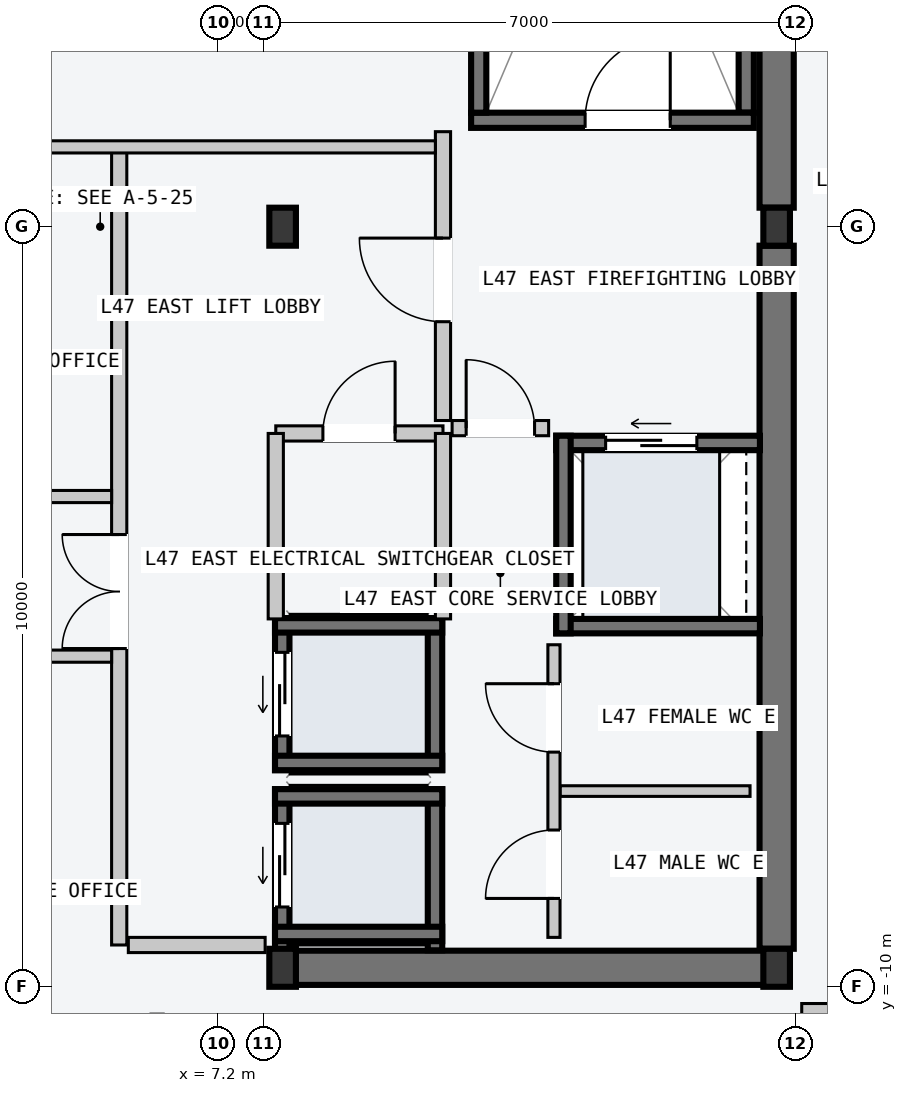
"""IFC4 building model, lengths in metres.
Left out: names, types, materials, properties, quantities, classifications, styles, units other than length and angle.
Written with IfcOpenShell. Run it as: python <this file> out.ifc"""

import sys

from ifc_helpers import new_model, si_unit, direction, frame, frame_2d, origin, origin_2d, place, context, subcontext, project, spatial, rectangle, i_section, extrude, element, fill, save


model = new_model("IFC4")
c1 = context("Model", 3, precision=1e-05, world=origin(), true_north=direction((0.0, 1.0)))
c2 = subcontext(c1, "Body", "Model", "MODEL_VIEW")
j1 = project(units=[si_unit("LENGTHUNIT", "METRE"), si_unit("PLANEANGLEUNIT", "RADIAN")], contexts=[c1])
p1 = place(None, origin())
s1 = spatial("IfcSite", under=j1, at=p1, CompositionType="ELEMENT")
p2 = place(p1, origin())
s2 = spatial("IfcBuilding", under=s1, at=p2, CompositionType="ELEMENT")
p3 = place(p2, frame((0.0, 0.0, 180.3)))
s3 = spatial("IfcBuildingStorey", under=s2, at=p3, CompositionType="ELEMENT", Elevation=180.3)
p4 = place(p3, frame((8.07, -9.75, -0.2), z_axis=(0.0, 0.0, 1.0), x_axis=(1.0, 0.0, 0.0)))
e1 = element("IfcWall", 1, at=p4, inside=s3, PredefinedType="SHEAR", context=c2, shape_type="SweptSolid", body=[
    extrude(rectangle(XDim=6.46, YDim=0.45, at=frame_2d((3.23, 0.0))), origin(), (0.0, 0.0, 1.0), 3.6),
])
for number, where, z_axis, x_axis in (
    (2, (14.55, -9.5, -0.2), (0.0, 0.0, 1.0), (0.0, 1.0, 0.0)),
    (3, (14.55, 0.25, -0.2), (0.0, 0.0, 1.0), (0.0, 1.0, 0.0)),
):
    element("IfcWall", number, at=place(p3, frame(where, z_axis=z_axis, x_axis=x_axis)), inside=s3, PredefinedType="SHEAR", context=c2, shape_type="SweptSolid", body=[
        extrude(rectangle(XDim=9.25, YDim=0.45, at=frame_2d((4.625, 0.0))), origin(), (0.0, 0.0, 1.0), 3.6),
    ])
p5 = place(p3, frame((14.15, 1.5, -0.2), z_axis=(0.0, 0.0, 1.0), x_axis=(0.0, 1.0, 0.0)))
e4 = element("IfcWall", 4, at=p5, inside=s3, PredefinedType="SOLIDWALL", context=c2, shape_type="SweptSolid", body=[
    extrude(rectangle(XDim=7.8, YDim=0.2, at=frame_2d((3.9, 0.0))), origin(), (0.0, 0.0, 1.0), 3.6),
])
p6 = place(p3, frame((10.53, 1.4, -0.2), z_axis=(0.0, 0.0, 1.0), x_axis=(1.0, 0.0, 0.0)))
e5 = element("IfcWall", 5, at=p6, inside=s3, PredefinedType="SOLIDWALL", context=c2, shape_type="SweptSolid", body=[
    extrude(rectangle(XDim=3.72, YDim=0.2, at=frame_2d((1.86, 0.0))), origin(), (0.0, 0.0, 1.0), 3.6),
])
p7 = place(p6, frame((1.5, 0.0, 0.2)))
e6 = element("IfcOpeningElement", 6, at=p7, cuts=e5, PredefinedType="OPENING", context=c2, shape_type="SweptSolid", body=[
    extrude(rectangle(XDim=1.12, YDim=2.18, at=frame_2d((0.56, 1.09))), frame((0.0, 0.11, 0.0), z_axis=(0.0, -1.0, 0.0), x_axis=(1.0, 0.0, 0.0)), (0.0, 0.0, 1.0), 0.22),
])
p8 = place(p3, frame((10.63, 1.5, -0.2), z_axis=(0.0, 0.0, 1.0), x_axis=(0.0, 1.0, 0.0)))
e7 = element("IfcWall", 7, at=p8, inside=s3, PredefinedType="SOLIDWALL", context=c2, shape_type="SweptSolid", body=[
    extrude(rectangle(XDim=7.8, YDim=0.2, at=frame_2d((3.9, 0.0))), origin(), (0.0, 0.0, 1.0), 3.6),
])
for number, where, z_axis, x_axis in (
    (8, (8.05, -9.75, 0.0), (0.0, 0.0, 1.0), (1.0, 0.0, 0.0)),
    (9, (8.05, 0.0, 0.0), (0.0, 0.0, 1.0), (1.0, 0.0, 0.0)),
    (10, (14.55, -9.75, 0.0), (0.0, 0.0, 1.0), (1.0, 0.0, 0.0)),
    (11, (14.55, 0.0, 0.0), (0.0, 0.0, 1.0), (1.0, 0.0, 0.0)),
):
    element("IfcColumn", number, at=place(p3, frame(where, z_axis=z_axis, x_axis=x_axis)), inside=s3, PredefinedType="COLUMN", context=c2, shape_type="SweptSolid", body=[
        extrude(i_section(OverallWidth=0.35, OverallDepth=0.5, WebThickness=0.02, FlangeThickness=0.032, at=origin_2d()), origin(), (0.0, 0.0, 1.0), 3.6),
    ])
p9 = place(p3, frame((8.045, -9.52, -0.2), z_axis=(0.0, 0.0, 1.0), x_axis=(0.0, 1.0, 0.0)))
e12 = element("IfcWall", 12, at=p9, inside=s3, PredefinedType="SOLIDWALL", context=c2, shape_type="SweptSolid", body=[
    extrude(rectangle(XDim=2.12, YDim=0.19, at=frame_2d((1.06, 0.0))), origin(), (0.0, 0.0, 1.0), 3.6),
])
p10 = place(p9, frame((0.57, 0.0, 0.2)))
e13 = element("IfcOpeningElement", 13, at=p10, cuts=e12, PredefinedType="OPENING", context=c2, shape_type="SweptSolid", body=[
    extrude(rectangle(XDim=1.1, YDim=2.2, at=frame_2d((0.55, 1.1))), frame((0.0, 0.105, 0.0), z_axis=(0.0, -1.0, 0.0), x_axis=(1.0, 0.0, 0.0)), (0.0, 0.0, 1.0), 0.21),
])
p11 = place(p3, frame((10.055, -9.52, -0.2), z_axis=(0.0, 0.0, 1.0), x_axis=(0.0, 1.0, 0.0)))
e14 = element("IfcWall", 14, at=p11, inside=s3, PredefinedType="SOLIDWALL", context=c2, shape_type="SweptSolid", body=[
    extrude(rectangle(XDim=2.12, YDim=0.19, at=frame_2d((1.06, 0.0))), origin(), (0.0, 0.0, 1.0), 3.6),
])
for number, where, z_axis, x_axis in (
    (15, (7.95, -7.495, -0.2), (0.0, 0.0, 1.0), (1.0, 0.0, 0.0)),
    (16, (7.95, -9.305, -0.2), (0.0, 0.0, 1.0), (1.0, 0.0, 0.0)),
):
    element("IfcWall", number, at=place(p3, frame(where, z_axis=z_axis, x_axis=x_axis)), inside=s3, PredefinedType="SOLIDWALL", context=c2, shape_type="SweptSolid", body=[
        extrude(rectangle(XDim=2.2, YDim=0.19, at=frame_2d((1.1, 0.0))), origin(), (0.0, 0.0, 1.0), 3.6),
    ])
p12 = place(p3, frame((8.045, -7.15, -0.2), z_axis=(0.0, 0.0, 1.0), x_axis=(0.0, 1.0, 0.0)))
e17 = element("IfcWall", 17, at=p12, inside=s3, PredefinedType="SOLIDWALL", context=c2, shape_type="SweptSolid", body=[
    extrude(rectangle(XDim=2.0, YDim=0.19, at=frame_2d((1.0, 0.0))), origin(), (0.0, 0.0, 1.0), 3.6),
])
p13 = place(p12, frame((0.45, 0.0, 0.2)))
e18 = element("IfcOpeningElement", 18, at=p13, cuts=e17, PredefinedType="OPENING", context=c2, shape_type="SweptSolid", body=[
    extrude(rectangle(XDim=1.1, YDim=2.2, at=frame_2d((0.55, 1.1))), frame((0.0, 0.105, 0.0), z_axis=(0.0, -1.0, 0.0), x_axis=(1.0, 0.0, 0.0)), (0.0, 0.0, 1.0), 0.21),
])
p14 = place(p3, frame((10.055, -7.15, -0.2), z_axis=(0.0, 0.0, 1.0), x_axis=(0.0, 1.0, 0.0)))
e19 = element("IfcWall", 19, at=p14, inside=s3, PredefinedType="SOLIDWALL", context=c2, shape_type="SweptSolid", body=[
    extrude(rectangle(XDim=2.0, YDim=0.19, at=frame_2d((1.0, 0.0))), origin(), (0.0, 0.0, 1.0), 3.6),
])
for number, where, z_axis, x_axis in (
    (20, (7.95, -5.245, -0.2), (0.0, 0.0, 1.0), (1.0, 0.0, 0.0)),
    (21, (7.95, -7.055, -0.2), (0.0, 0.0, 1.0), (1.0, 0.0, 0.0)),
):
    element("IfcWall", number, at=place(p3, frame(where, z_axis=z_axis, x_axis=x_axis)), inside=s3, PredefinedType="SOLIDWALL", context=c2, shape_type="SweptSolid", body=[
        extrude(rectangle(XDim=2.2, YDim=0.19, at=frame_2d((1.1, 0.0))), origin(), (0.0, 0.0, 1.0), 3.6),
    ])
p15 = place(p3, frame((11.65, -2.845, -0.2), z_axis=(0.0, 0.0, 1.0), x_axis=(1.0, 0.0, 0.0)))
e22 = element("IfcWall", 22, at=p15, inside=s3, PredefinedType="SOLIDWALL", context=c2, shape_type="SweptSolid", body=[
    extrude(rectangle(XDim=2.68, YDim=0.19, at=frame_2d((1.34, 0.0))), origin(), (0.0, 0.0, 1.0), 3.6),
])
p16 = place(p15, frame((0.65, 0.0, 0.2)))
e23 = element("IfcOpeningElement", 23, at=p16, cuts=e22, PredefinedType="OPENING", context=c2, shape_type="SweptSolid", body=[
    extrude(rectangle(XDim=1.2, YDim=2.2, at=frame_2d((0.6, 1.1))), frame((0.0, 0.105, 0.0), z_axis=(0.0, -1.0, 0.0), x_axis=(1.0, 0.0, 0.0)), (0.0, 0.0, 1.0), 0.21),
])
p17 = place(p3, frame((11.65, -5.255, -0.2), z_axis=(0.0, 0.0, 1.0), x_axis=(1.0, 0.0, 0.0)))
e24 = element("IfcWall", 24, at=p17, inside=s3, PredefinedType="SOLIDWALL", context=c2, shape_type="SweptSolid", body=[
    extrude(rectangle(XDim=2.68, YDim=0.19, at=frame_2d((1.34, 0.0))), origin(), (0.0, 0.0, 1.0), 3.6),
])
p18 = place(p3, frame((11.745, -5.35, -0.2), z_axis=(0.0, 0.0, 1.0), x_axis=(0.0, 1.0, 0.0)))
e25 = element("IfcWall", 25, at=p18, inside=s3, PredefinedType="SOLIDWALL", context=c2, shape_type="SweptSolid", body=[
    extrude(rectangle(XDim=2.6, YDim=0.19, at=frame_2d((1.3, 0.0))), origin(), (0.0, 0.0, 1.0), 3.6),
])
p19 = place(p3, frame((5.9, -9.45, 0.0), z_axis=(0.0, 0.0, 1.0), x_axis=(0.0, 1.0, 0.0)))
e26 = element("IfcWall", 26, at=p19, inside=s3, PredefinedType="PARTITIONING", context=c2, shape_type="SweptSolid", body=[
    extrude(rectangle(XDim=10.5, YDim=0.2, at=frame_2d((5.25, 0.0))), origin(), (0.0, 0.0, 1.0), 3.4),
])
p20 = place(p19, frame((3.9, 0.0, 0.0)))
e27 = element("IfcOpeningElement", 27, at=p20, cuts=e26, PredefinedType="OPENING", context=c2, shape_type="SweptSolid", body=[
    extrude(rectangle(XDim=1.5, YDim=2.2, at=frame_2d((0.75, 1.1))), frame((0.0, 0.11, 0.0), z_axis=(0.0, -1.0, 0.0), x_axis=(1.0, 0.0, 0.0)), (0.0, 0.0, 1.0), 0.22),
])
p21 = place(p3, frame((6.02, -9.45, 0.0), z_axis=(0.0, 0.0, 1.0), x_axis=(1.0, 0.0, 0.0)))
e28 = element("IfcWall", 28, at=p21, inside=s3, PredefinedType="PARTITIONING", context=c2, shape_type="SweptSolid", body=[
    extrude(rectangle(XDim=1.8, YDim=0.2, at=frame_2d((0.9, 0.0))), origin(), (0.0, 0.0, 1.0), 3.4),
])
p22 = place(p3, frame((10.16, -2.55, 0.0), z_axis=(0.0, 0.0, 1.0), x_axis=(0.0, 1.0, 0.0)))
e29 = element("IfcWall", 29, at=p22, inside=s3, PredefinedType="PARTITIONING", context=c2, shape_type="SweptSolid", body=[
    extrude(rectangle(XDim=3.8, YDim=0.2, at=frame_2d((1.9, 0.0))), origin(), (0.0, 0.0, 1.0), 3.4),
])
p23 = place(p22, frame((1.3, 0.0, 0.0)))
e30 = element("IfcOpeningElement", 30, at=p23, cuts=e29, PredefinedType="OPENING", context=c2, shape_type="SweptSolid", body=[
    extrude(rectangle(XDim=1.1, YDim=2.15, at=frame_2d((0.55, 1.075))), frame((0.0, 0.11, 0.0), z_axis=(0.0, -1.0, 0.0), x_axis=(1.0, 0.0, 0.0)), (0.0, 0.0, 1.0), 0.22),
])
p24 = place(p3, frame((10.28, -2.65, 0.0), z_axis=(0.0, 0.0, 1.0), x_axis=(1.0, 0.0, 0.0)))
e31 = element("IfcWall", 31, at=p24, inside=s3, PredefinedType="PARTITIONING", context=c2, shape_type="SweptSolid", body=[
    extrude(rectangle(XDim=1.27, YDim=0.2, at=frame_2d((0.635, 0.0))), origin(), (0.0, 0.0, 1.0), 3.4),
])
p25 = place(p24, frame((0.185, 0.0, 0.0)))
e32 = element("IfcOpeningElement", 32, at=p25, cuts=e31, PredefinedType="OPENING", context=c2, shape_type="SweptSolid", body=[
    extrude(rectangle(XDim=0.9, YDim=2.15, at=frame_2d((0.45, 1.075))), frame((0.0, 0.11, 0.0), z_axis=(0.0, -1.0, 0.0), x_axis=(1.0, 0.0, 0.0)), (0.0, 0.0, 1.0), 0.22),
])
p26 = place(p3, frame((7.96, -2.72, 0.0), z_axis=(0.0, 0.0, 1.0), x_axis=(1.0, 0.0, 0.0)))
e33 = element("IfcWall", 33, at=p26, inside=s3, PredefinedType="PARTITIONING", context=c2, shape_type="SweptSolid", body=[
    extrude(rectangle(XDim=2.2, YDim=0.2, at=frame_2d((1.1, 0.0))), origin(), (0.0, 0.0, 1.0), 3.4),
])
p27 = place(p26, frame((0.62, 0.0, 0.0)))
e34 = element("IfcOpeningElement", 34, at=p27, cuts=e33, PredefinedType="OPENING", context=c2, shape_type="SweptSolid", body=[
    extrude(rectangle(XDim=0.95, YDim=2.1, at=frame_2d((0.475, 1.05))), frame((0.0, 0.11, 0.0), z_axis=(0.0, -1.0, 0.0), x_axis=(1.0, 0.0, 0.0)), (0.0, 0.0, 1.0), 0.22),
])
for number, where, z_axis, x_axis in (
    (35, (7.96, -5.16, 0.0), (0.0, 0.0, 1.0), (0.0, 1.0, 0.0)),
    (36, (10.16, -5.16, 0.0), (0.0, 0.0, 1.0), (0.0, 1.0, 0.0)),
):
    element("IfcWall", number, at=place(p3, frame(where, z_axis=z_axis, x_axis=x_axis)), inside=s3, PredefinedType="PARTITIONING", context=c2, shape_type="SweptSolid", body=[
        extrude(rectangle(XDim=2.44, YDim=0.2, at=frame_2d((1.22, 0.0))), origin(), (0.0, 0.0, 1.0), 3.4),
    ])
p28 = place(p3, frame((11.7, -7.425, 0.0), z_axis=(0.0, 0.0, 1.0), x_axis=(1.0, 0.0, 0.0)))
e37 = element("IfcWall", 37, at=p28, inside=s3, PredefinedType="PARTITIONING", context=c2, shape_type="SweptSolid", body=[
    extrude(rectangle(XDim=2.5, YDim=0.14, at=frame_2d((1.25, 0.0))), origin(), (0.0, 0.0, 1.0), 3.4),
])
p29 = place(p3, frame((11.62, -9.35, 0.0), z_axis=(0.0, 0.0, 1.0), x_axis=(0.0, 1.0, 0.0)))
e38 = element("IfcWall", 38, at=p29, inside=s3, PredefinedType="PARTITIONING", context=c2, shape_type="SweptSolid", body=[
    extrude(rectangle(XDim=3.85, YDim=0.16, at=frame_2d((1.925, 0.0))), origin(), (0.0, 0.0, 1.0), 3.4),
])
p30 = place(p29, frame((0.512, 0.0, 0.0)))
e39 = element("IfcOpeningElement", 39, at=p30, cuts=e38, PredefinedType="OPENING", context=c2, shape_type="SweptSolid", body=[
    extrude(rectangle(XDim=0.9, YDim=2.15, at=frame_2d((0.45, 1.075))), frame((0.0, 0.09, 0.0), z_axis=(0.0, -1.0, 0.0), x_axis=(1.0, 0.0, 0.0)), (0.0, 0.0, 1.0), 0.18),
])
p31 = place(p29, frame((2.438, 0.0, 0.0)))
e40 = element("IfcOpeningElement", 40, at=p31, cuts=e38, PredefinedType="OPENING", context=c2, shape_type="SweptSolid", body=[
    extrude(rectangle(XDim=0.9, YDim=2.15, at=frame_2d((0.45, 1.075))), frame((0.0, 0.09, 0.0), z_axis=(0.0, -1.0, 0.0), x_axis=(1.0, 0.0, 0.0)), (0.0, 0.0, 1.0), 0.18),
])
p32 = place(p3, frame((1.26, 1.05, 0.0), z_axis=(0.0, 0.0, 1.0), x_axis=(1.0, 0.0, 0.0)))
e41 = element("IfcWall", 41, at=p32, inside=s3, PredefinedType="PARTITIONING", context=c2, shape_type="SweptSolid", body=[
    extrude(rectangle(XDim=8.8, YDim=0.16, at=frame_2d((4.4, 0.0))), origin(), (0.0, 0.0, 1.0), 3.4),
])
for number, where, z_axis, x_axis in (
    (42, (1.26, -3.55, 0.0), (0.0, 0.0, 1.0), (1.0, 0.0, 0.0)),
    (43, (1.26, -5.65, 0.0), (0.0, 0.0, 1.0), (1.0, 0.0, 0.0)),
):
    element("IfcWall", number, at=place(p3, frame(where, z_axis=z_axis, x_axis=x_axis)), inside=s3, PredefinedType="PARTITIONING", context=c2, shape_type="SweptSolid", body=[
        extrude(rectangle(XDim=4.54, YDim=0.16, at=frame_2d((2.27, 0.0))), origin(), (0.0, 0.0, 1.0), 3.4),
    ])
p33 = place(p3, frame((14.88, -10.3, 0.0), z_axis=(0.0, 0.0, 1.0), x_axis=(1.0, 0.0, 0.0)))
e44 = element("IfcWall", 44, at=p33, inside=s3, PredefinedType="PARTITIONING", context=c2, shape_type="SweptSolid", body=[
    extrude(rectangle(XDim=5.68, YDim=0.16, at=frame_2d((2.84, 0.0))), origin(), (0.0, 0.0, 1.0), 3.4),
])
p34 = place(p33, frame((2.36, 0.0, 0.0)))
e45 = element("IfcOpeningElement", 45, at=p34, cuts=e44, PredefinedType="OPENING", context=c2, shape_type="SweptSolid", body=[
    extrude(rectangle(XDim=0.96, YDim=2.18, at=frame_2d((0.48, 1.09))), frame((0.0, 0.09, 0.0), z_axis=(0.0, -1.0, 0.0), x_axis=(1.0, 0.0, 0.0)), (0.0, 0.0, 1.0), 0.18),
])
p35 = place(p7, origin())
e46 = element("IfcDoor", 46, at=p35, inside=s3, OperationType="SINGLE_SWING_RIGHT", PredefinedType="DOOR", context=c2, shape_type="SweptSolid", body=[
    extrude(rectangle(XDim=1.12, YDim=2.18, at=frame_2d((0.56, 1.09))), frame((0.0, 0.025, 0.0), z_axis=(0.0, -1.0, 0.0), x_axis=(1.0, 0.0, 0.0)), (0.0, 0.0, 1.0), 0.05),
])
fill(e6, e46)
p36 = place(p10, origin())
e47 = element("IfcDoor", 47, at=p36, inside=s3, OperationType="SLIDING_TO_LEFT", PredefinedType="DOOR", context=c2, shape_type="SweptSolid", body=[
    extrude(rectangle(XDim=1.1, YDim=2.2, at=frame_2d((0.55, 1.1))), frame((0.0, 0.025, 0.0), z_axis=(0.0, -1.0, 0.0), x_axis=(1.0, 0.0, 0.0)), (0.0, 0.0, 1.0), 0.05),
])
fill(e13, e47)
p37 = place(p13, origin())
e48 = element("IfcDoor", 48, at=p37, inside=s3, OperationType="SLIDING_TO_LEFT", PredefinedType="DOOR", context=c2, shape_type="SweptSolid", body=[
    extrude(rectangle(XDim=1.1, YDim=2.2, at=frame_2d((0.55, 1.1))), frame((0.0, 0.025, 0.0), z_axis=(0.0, -1.0, 0.0), x_axis=(1.0, 0.0, 0.0)), (0.0, 0.0, 1.0), 0.05),
])
fill(e18, e48)
p38 = place(p16, origin())
e49 = element("IfcDoor", 49, at=p38, inside=s3, OperationType="SLIDING_TO_LEFT", PredefinedType="DOOR", context=c2, shape_type="SweptSolid", body=[
    extrude(rectangle(XDim=1.2, YDim=2.2, at=frame_2d((0.6, 1.1))), frame((0.0, 0.025, 0.0), z_axis=(0.0, -1.0, 0.0), x_axis=(1.0, 0.0, 0.0)), (0.0, 0.0, 1.0), 0.05),
])
fill(e23, e49)
p39 = place(p20, origin())
e50 = element("IfcDoor", 50, at=p39, inside=s3, OperationType="DOUBLE_DOOR_SINGLE_SWING", PredefinedType="DOOR", context=c2, shape_type="SweptSolid", body=[
    extrude(rectangle(XDim=1.5, YDim=2.2, at=frame_2d((0.75, 1.1))), frame((0.0, 0.025, 0.0), z_axis=(0.0, -1.0, 0.0), x_axis=(1.0, 0.0, 0.0)), (0.0, 0.0, 1.0), 0.05),
])
fill(e27, e50)
p40 = place(p23, origin())
e51 = element("IfcDoor", 51, at=p40, inside=s3, OperationType="SINGLE_SWING_RIGHT", PredefinedType="DOOR", context=c2, shape_type="SweptSolid", body=[
    extrude(rectangle(XDim=1.1, YDim=2.15, at=frame_2d((0.55, 1.075))), frame((0.0, 0.025, 0.0), z_axis=(0.0, -1.0, 0.0), x_axis=(1.0, 0.0, 0.0)), (0.0, 0.0, 1.0), 0.05),
])
fill(e30, e51)
p41 = place(p25, origin())
e52 = element("IfcDoor", 52, at=p41, inside=s3, OperationType="SINGLE_SWING_LEFT", PredefinedType="DOOR", context=c2, shape_type="SweptSolid", body=[
    extrude(rectangle(XDim=0.9, YDim=2.15, at=frame_2d((0.45, 1.075))), frame((0.0, 0.025, 0.0), z_axis=(0.0, -1.0, 0.0), x_axis=(1.0, 0.0, 0.0)), (0.0, 0.0, 1.0), 0.05),
])
fill(e32, e52)
p42 = place(p27, origin())
e53 = element("IfcDoor", 53, at=p42, inside=s3, OperationType="SINGLE_SWING_RIGHT", PredefinedType="DOOR", context=c2, shape_type="SweptSolid", body=[
    extrude(rectangle(XDim=0.95, YDim=2.1, at=frame_2d((0.475, 1.05))), frame((0.0, 0.025, 0.0), z_axis=(0.0, -1.0, 0.0), x_axis=(1.0, 0.0, 0.0)), (0.0, 0.0, 1.0), 0.05),
])
fill(e34, e53)
p43 = place(p30, origin())
e54 = element("IfcDoor", 54, at=p43, inside=s3, OperationType="SINGLE_SWING_LEFT", PredefinedType="DOOR", context=c2, shape_type="SweptSolid", body=[
    extrude(rectangle(XDim=0.9, YDim=2.15, at=frame_2d((0.45, 1.075))), frame((0.0, 0.025, 0.0), z_axis=(0.0, -1.0, 0.0), x_axis=(1.0, 0.0, 0.0)), (0.0, 0.0, 1.0), 0.05),
])
fill(e39, e54)
p44 = place(p31, origin())
e55 = element("IfcDoor", 55, at=p44, inside=s3, OperationType="SINGLE_SWING_RIGHT", PredefinedType="DOOR", context=c2, shape_type="SweptSolid", body=[
    extrude(rectangle(XDim=0.9, YDim=2.15, at=frame_2d((0.45, 1.075))), frame((0.0, 0.025, 0.0), z_axis=(0.0, -1.0, 0.0), x_axis=(1.0, 0.0, 0.0)), (0.0, 0.0, 1.0), 0.05),
])
fill(e40, e55)
save(model, sys.argv[1])
